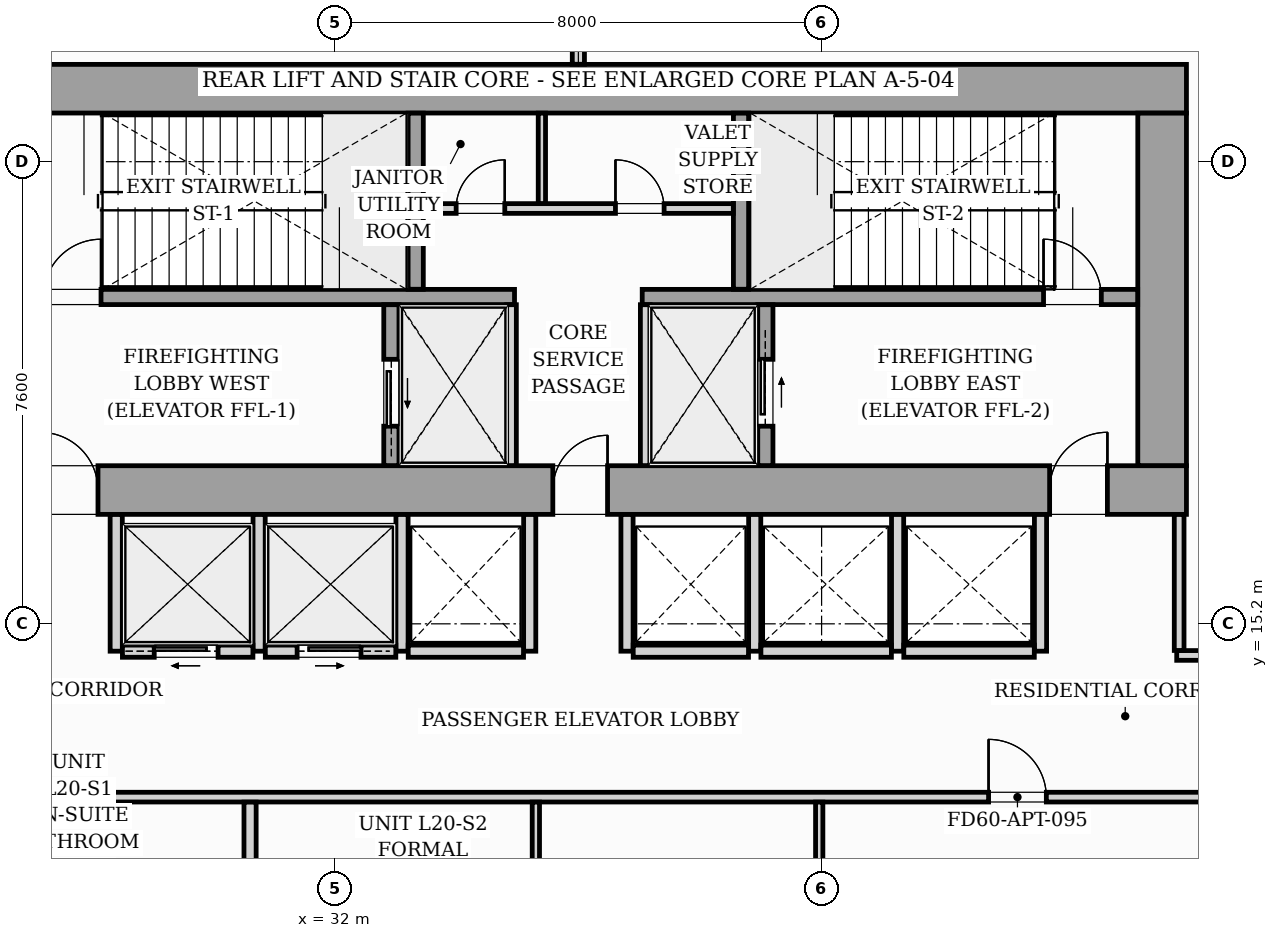
"""IFC4 building model, lengths in metres.
Left out: names, types, materials, properties, quantities, classifications, styles, units other than length and angle.
Written with IfcOpenShell. Run it as: python <this file> out.ifc"""

import sys

from ifc_helpers import new_model, si_unit, direction, frame, frame_2d, origin, origin_2d, place, context, subcontext, project, spatial, rectangle, i_section, extrude, source, transform, mapped, element, fill, save


model = new_model("IFC4")
c1 = context("Model", 3, precision=1e-05, world=origin(), true_north=direction((0.0, 1.0)))
c2 = subcontext(c1, "Body", "Model", "MODEL_VIEW")
j1 = project(units=[si_unit("LENGTHUNIT", "METRE"), si_unit("PLANEANGLEUNIT", "RADIAN")], contexts=[c1])
p1 = place(None, origin())
s1 = spatial("IfcSite", under=j1, at=p1, CompositionType="ELEMENT")
p2 = place(p1, origin())
s2 = spatial("IfcBuilding", under=s1, at=p2, CompositionType="ELEMENT")
p3 = place(p2, frame((0.0, 0.0, 72.6)))
s3 = spatial("IfcBuildingStorey", under=s2, at=p3, CompositionType="ELEMENT", Elevation=72.6)
m1 = source(origin(), c2, "Body", "SweptSolid", [
    extrude(i_section(OverallWidth=0.427, OverallDepth=0.483, WebThickness=0.051, FlangeThickness=0.082, FilletRadius=0.018, at=origin_2d()), origin(), (0.0, 0.0, 1.0), 5.196),
])
for number, where, z_axis, x_axis in (
    (1, (33.12, 17.4, 0.002), (0.0, 0.0, 1.0), (1.0, 0.0, 0.0)),
    (2, (38.88, 17.4, 0.002), (0.0, 0.0, 1.0), (1.0, 0.0, 0.0)),
    (3, (45.6, 17.4, 0.002), (0.0, 0.0, 1.0), (1.0, 0.0, 0.0)),
    (4, (33.12, 24.0, 0.002), (0.0, 0.0, 1.0), (1.0, 0.0, 0.0)),
    (5, (38.88, 24.0, 0.002), (0.0, 0.0, 1.0), (1.0, 0.0, 0.0)),
    (6, (45.6, 24.0, 0.002), (0.0, 0.0, 1.0), (1.0, 0.0, 0.0)),
):
    element("IfcColumn", number, at=place(p3, frame(where, z_axis=z_axis, x_axis=x_axis)), inside=s3, PredefinedType="PILASTER", context=c2, shape_type="MappedRepresentation", body=[
        mapped(m1, transform((0.0, 0.0, 0.0), scale=1.0)),
    ])
p4 = place(p3, frame((26.0, 17.4, 0.0), z_axis=(0.0, 0.0, 1.0), x_axis=(1.0, 0.0, 0.0)))
e7 = element("IfcWall", 7, at=p4, inside=s3, PredefinedType="SHEAR", context=c2, shape_type="SweptSolid", body=[
    extrude(rectangle(XDim=20.0, YDim=0.8, at=frame_2d((10.0, 0.0))), origin(), (0.0, 0.0, 1.0), 5.2),
])
p5 = place(p4, frame((1.15, 0.0, 0.0)))
e8 = element("IfcOpeningElement", 8, at=p5, cuts=e7, PredefinedType="OPENING", context=c2, shape_type="SweptSolid", body=[
    extrude(rectangle(XDim=0.95, YDim=2.06, at=frame_2d((0.475, 1.03))), frame((0.0, 0.41, 0.0), z_axis=(0.0, -1.0, 0.0), x_axis=(1.0, 0.0, 0.0)), (0.0, 0.0, 1.0), 0.82),
])
p6 = place(p4, frame((9.58, 0.0, 0.0)))
e9 = element("IfcOpeningElement", 9, at=p6, cuts=e7, PredefinedType="OPENING", context=c2, shape_type="SweptSolid", body=[
    extrude(rectangle(XDim=0.9, YDim=2.06, at=frame_2d((0.45, 1.03))), frame((0.0, 0.41, 0.0), z_axis=(0.0, -1.0, 0.0), x_axis=(1.0, 0.0, 0.0)), (0.0, 0.0, 1.0), 0.82),
])
p7 = place(p4, frame((17.75, 0.0, 0.0)))
e10 = element("IfcOpeningElement", 10, at=p7, cuts=e7, PredefinedType="OPENING", context=c2, shape_type="SweptSolid", body=[
    extrude(rectangle(XDim=0.95, YDim=2.06, at=frame_2d((0.475, 1.03))), frame((0.0, 0.41, 0.0), z_axis=(0.0, -1.0, 0.0), x_axis=(1.0, 0.0, 0.0)), (0.0, 0.0, 1.0), 0.82),
])
p8 = place(p3, frame((26.0, 24.0, 0.0), z_axis=(0.0, 0.0, 1.0), x_axis=(1.0, 0.0, 0.0)))
e11 = element("IfcWall", 11, at=p8, inside=s3, PredefinedType="SHEAR", context=c2, shape_type="SweptSolid", body=[
    extrude(rectangle(XDim=20.0, YDim=0.8, at=frame_2d((10.0, 0.0))), origin(), (0.0, 0.0, 1.0), 5.2),
])
p9 = place(p3, frame((45.6, 17.802, 0.0), z_axis=(0.0, 0.0, 1.0), x_axis=(0.0, 1.0, 0.0)))
e12 = element("IfcWall", 12, at=p9, inside=s3, PredefinedType="SHEAR", context=c2, shape_type="SweptSolid", body=[
    extrude(rectangle(XDim=5.796, YDim=0.8, at=frame_2d((2.898, 0.0))), origin(), (0.0, 0.0, 1.0), 5.2),
])
p10 = place(p3, frame((26.802, 20.575, 0.0), z_axis=(0.0, 0.0, 1.0), x_axis=(1.0, 0.0, 0.0)))
e13 = element("IfcWall", 13, at=p10, inside=s3, PredefinedType="SOLIDWALL", context=c2, shape_type="SweptSolid", body=[
    extrude(rectangle(XDim=8.148, YDim=0.25, at=frame_2d((4.074, 0.0))), origin(), (0.0, 0.0, 1.0), 5.2),
])
p11 = place(p10, frame((0.398, 0.0, 0.0)))
e14 = element("IfcOpeningElement", 14, at=p11, cuts=e13, PredefinedType="OPENING", context=c2, shape_type="SweptSolid", body=[
    extrude(rectangle(XDim=0.95, YDim=2.06, at=frame_2d((0.475, 1.03))), frame((0.0, 0.135, 0.0), z_axis=(0.0, -1.0, 0.0), x_axis=(1.0, 0.0, 0.0)), (0.0, 0.0, 1.0), 0.27),
])
p12 = place(p3, frame((37.05, 20.575, 0.0), z_axis=(0.0, 0.0, 1.0), x_axis=(1.0, 0.0, 0.0)))
e15 = element("IfcWall", 15, at=p12, inside=s3, PredefinedType="SOLIDWALL", context=c2, shape_type="SweptSolid", body=[
    extrude(rectangle(XDim=8.148, YDim=0.25, at=frame_2d((4.074, 0.0))), origin(), (0.0, 0.0, 1.0), 5.2),
])
p13 = place(p12, frame((6.6, 0.0, 0.0)))
e16 = element("IfcOpeningElement", 16, at=p13, cuts=e15, PredefinedType="OPENING", context=c2, shape_type="SweptSolid", body=[
    extrude(rectangle(XDim=0.95, YDim=2.06, at=frame_2d((0.475, 1.03))), frame((0.0, 0.135, 0.0), z_axis=(0.0, -1.0, 0.0), x_axis=(1.0, 0.0, 0.0)), (0.0, 0.0, 1.0), 0.27),
])
for number, where, z_axis, x_axis in (
    (17, (33.325, 20.702, 0.0), (0.0, 0.0, 1.0), (0.0, 1.0, 0.0)),
    (18, (38.675, 20.702, 0.0), (0.0, 0.0, 1.0), (0.0, 1.0, 0.0)),
):
    element("IfcWall", number, at=place(p3, frame(where, z_axis=z_axis, x_axis=x_axis)), inside=s3, PredefinedType="SOLIDWALL", context=c2, shape_type="SweptSolid", body=[
        extrude(rectangle(XDim=2.896, YDim=0.25, at=frame_2d((1.448, 0.0))), origin(), (0.0, 0.0, 1.0), 5.2),
    ])
p14 = place(p3, frame((32.925, 17.802, 0.0), z_axis=(0.0, 0.0, 1.0), x_axis=(0.0, 1.0, 0.0)))
e19 = element("IfcWall", 19, at=p14, inside=s3, PredefinedType="SOLIDWALL", context=c2, shape_type="SweptSolid", body=[
    extrude(rectangle(XDim=2.646, YDim=0.25, at=frame_2d((1.323, 0.0))), origin(), (0.0, 0.0, 1.0), 5.2),
])
p15 = place(p14, frame((0.648, 0.0, 0.0)))
e20 = element("IfcOpeningElement", 20, at=p15, cuts=e19, PredefinedType="OPENING", context=c2, shape_type="SweptSolid", body=[
    extrude(rectangle(XDim=1.1, YDim=2.08, at=frame_2d((0.55, 1.04))), frame((0.0, 0.135, 0.0), z_axis=(0.0, -1.0, 0.0), x_axis=(1.0, 0.0, 0.0)), (0.0, 0.0, 1.0), 0.27),
])
for number, where, z_axis, x_axis in (
    (21, (34.9, 17.802, 0.0), (0.0, 0.0, 1.0), (0.0, 1.0, 0.0)),
    (22, (37.1, 17.802, 0.0), (0.0, 0.0, 1.0), (0.0, 1.0, 0.0)),
):
    element("IfcWall", number, at=place(p3, frame(where, z_axis=z_axis, x_axis=x_axis)), inside=s3, PredefinedType="PARTITIONING", context=c2, shape_type="SweptSolid", body=[
        extrude(rectangle(XDim=2.646, YDim=0.16, at=frame_2d((1.323, 0.0))), origin(), (0.0, 0.0, 1.0), 4.78),
    ])
p16 = place(p3, frame((39.075, 17.802, 0.0), z_axis=(0.0, 0.0, 1.0), x_axis=(0.0, 1.0, 0.0)))
e23 = element("IfcWall", 23, at=p16, inside=s3, PredefinedType="SOLIDWALL", context=c2, shape_type="SweptSolid", body=[
    extrude(rectangle(XDim=2.646, YDim=0.25, at=frame_2d((1.323, 0.0))), origin(), (0.0, 0.0, 1.0), 5.2),
])
p17 = place(p16, frame((0.648, 0.0, 0.0)))
e24 = element("IfcOpeningElement", 24, at=p17, cuts=e23, PredefinedType="OPENING", context=c2, shape_type="SweptSolid", body=[
    extrude(rectangle(XDim=1.1, YDim=2.08, at=frame_2d((0.55, 1.04))), frame((0.0, 0.135, 0.0), z_axis=(0.0, -1.0, 0.0), x_axis=(1.0, 0.0, 0.0)), (0.0, 0.0, 1.0), 0.27),
])
p18 = place(p3, frame((33.452, 22.03, 0.0), z_axis=(0.0, 0.0, 1.0), x_axis=(1.0, 0.0, 0.0)))
e25 = element("IfcWall", 25, at=p18, inside=s3, PredefinedType="PARTITIONING", context=c2, shape_type="SweptSolid", body=[
    extrude(rectangle(XDim=5.096, YDim=0.16, at=frame_2d((2.548, 0.0))), origin(), (0.0, 0.0, 1.0), 4.78),
])
p19 = place(p18, frame((0.538, 0.0, 0.0)))
e26 = element("IfcOpeningElement", 26, at=p19, cuts=e25, PredefinedType="OPENING", context=c2, shape_type="SweptSolid", body=[
    extrude(rectangle(XDim=0.8, YDim=2.05, at=frame_2d((0.4, 1.025))), frame((0.0, 0.09, 0.0), z_axis=(0.0, -1.0, 0.0), x_axis=(1.0, 0.0, 0.0)), (0.0, 0.0, 1.0), 0.18),
])
p20 = place(p18, frame((3.158, 0.0, 0.0)))
e27 = element("IfcOpeningElement", 27, at=p20, cuts=e25, PredefinedType="OPENING", context=c2, shape_type="SweptSolid", body=[
    extrude(rectangle(XDim=0.8, YDim=2.05, at=frame_2d((0.4, 1.025))), frame((0.0, 0.09, 0.0), z_axis=(0.0, -1.0, 0.0), x_axis=(1.0, 0.0, 0.0)), (0.0, 0.0, 1.0), 0.18),
])
p21 = place(p3, frame((35.4, 22.112, 0.0), z_axis=(0.0, 0.0, 1.0), x_axis=(0.0, 1.0, 0.0)))
e28 = element("IfcWall", 28, at=p21, inside=s3, PredefinedType="PARTITIONING", context=c2, shape_type="SweptSolid", body=[
    extrude(rectangle(XDim=1.486, YDim=0.12, at=frame_2d((0.743, 0.0))), origin(), (0.0, 0.0, 1.0), 4.78),
])
for number, where, z_axis, x_axis in (
    (29, (28.4, 14.75, 0.0), (0.0, 0.0, 1.0), (0.0, 1.0, 0.0)),
    (30, (30.75, 14.75, 0.0), (0.0, 0.0, 1.0), (0.0, 1.0, 0.0)),
    (31, (33.1, 14.75, 0.0), (0.0, 0.0, 1.0), (0.0, 1.0, 0.0)),
):
    element("IfcWall", number, at=place(p3, frame(where, z_axis=z_axis, x_axis=x_axis)), inside=s3, PredefinedType="PARTITIONING", context=c2, shape_type="SweptSolid", body=[
        extrude(rectangle(XDim=2.248, YDim=0.2, at=frame_2d((1.124, 0.0))), origin(), (0.0, 0.0, 1.0), 4.78),
    ])
p22 = place(p3, frame((28.502, 14.75, 0.0), z_axis=(0.0, 0.0, 1.0), x_axis=(1.0, 0.0, 0.0)))
e32 = element("IfcWall", 32, at=p22, inside=s3, PredefinedType="PARTITIONING", context=c2, shape_type="SweptSolid", body=[
    extrude(rectangle(XDim=2.146, YDim=0.2, at=frame_2d((1.073, 0.0))), origin(), (0.0, 0.0, 1.0), 4.78),
])
p23 = place(p22, frame((0.523, 0.0, 0.0)))
e33 = element("IfcOpeningElement", 33, at=p23, cuts=e32, PredefinedType="OPENING", context=c2, shape_type="SweptSolid", body=[
    extrude(rectangle(XDim=1.05, YDim=2.08, at=frame_2d((0.525, 1.04))), frame((0.0, 0.11, 0.0), z_axis=(0.0, -1.0, 0.0), x_axis=(1.0, 0.0, 0.0)), (0.0, 0.0, 1.0), 0.22),
])
p24 = place(p3, frame((30.852, 14.75, 0.0), z_axis=(0.0, 0.0, 1.0), x_axis=(1.0, 0.0, 0.0)))
e34 = element("IfcWall", 34, at=p24, inside=s3, PredefinedType="PARTITIONING", context=c2, shape_type="SweptSolid", body=[
    extrude(rectangle(XDim=2.146, YDim=0.2, at=frame_2d((1.073, 0.0))), origin(), (0.0, 0.0, 1.0), 4.78),
])
p25 = place(p24, frame((0.523, 0.0, 0.0)))
e35 = element("IfcOpeningElement", 35, at=p25, cuts=e34, PredefinedType="OPENING", context=c2, shape_type="SweptSolid", body=[
    extrude(rectangle(XDim=1.05, YDim=2.08, at=frame_2d((0.525, 1.04))), frame((0.0, 0.11, 0.0), z_axis=(0.0, -1.0, 0.0), x_axis=(1.0, 0.0, 0.0)), (0.0, 0.0, 1.0), 0.22),
])
p26 = place(p3, frame((35.2, 14.75, 0.0), z_axis=(0.0, 0.0, 1.0), x_axis=(0.0, 1.0, 0.0)))
e36 = element("IfcWall", 36, at=p26, inside=s3, PredefinedType="PARTITIONING", context=c2, shape_type="SweptSolid", body=[
    extrude(rectangle(XDim=2.248, YDim=0.2, at=frame_2d((1.124, 0.0))), origin(), (0.0, 0.0, 1.0), 4.78),
])
p27 = place(p3, frame((33.202, 14.75, 0.0), z_axis=(0.0, 0.0, 1.0), x_axis=(1.0, 0.0, 0.0)))
e37 = element("IfcWall", 37, at=p27, inside=s3, PredefinedType="PARTITIONING", context=c2, shape_type="SweptSolid", body=[
    extrude(rectangle(XDim=1.896, YDim=0.2, at=frame_2d((0.948, 0.0))), origin(), (0.0, 0.0, 1.0), 4.78),
])
for number, where, z_axis, x_axis in (
    (38, (36.8, 14.75, 0.0), (0.0, 0.0, 1.0), (0.0, 1.0, 0.0)),
    (39, (38.9, 14.75, 0.0), (0.0, 0.0, 1.0), (0.0, 1.0, 0.0)),
):
    element("IfcWall", number, at=place(p3, frame(where, z_axis=z_axis, x_axis=x_axis)), inside=s3, PredefinedType="PARTITIONING", context=c2, shape_type="SweptSolid", body=[
        extrude(rectangle(XDim=2.248, YDim=0.2, at=frame_2d((1.124, 0.0))), origin(), (0.0, 0.0, 1.0), 4.78),
    ])
p28 = place(p3, frame((36.902, 14.75, 0.0), z_axis=(0.0, 0.0, 1.0), x_axis=(1.0, 0.0, 0.0)))
e40 = element("IfcWall", 40, at=p28, inside=s3, PredefinedType="PARTITIONING", context=c2, shape_type="SweptSolid", body=[
    extrude(rectangle(XDim=1.896, YDim=0.2, at=frame_2d((0.948, 0.0))), origin(), (0.0, 0.0, 1.0), 4.78),
])
for number, where, z_axis, x_axis in (
    (41, (41.25, 14.75, 0.0), (0.0, 0.0, 1.0), (0.0, 1.0, 0.0)),
    (42, (43.6, 14.75, 0.0), (0.0, 0.0, 1.0), (0.0, 1.0, 0.0)),
):
    element("IfcWall", number, at=place(p3, frame(where, z_axis=z_axis, x_axis=x_axis)), inside=s3, PredefinedType="PARTITIONING", context=c2, shape_type="SweptSolid", body=[
        extrude(rectangle(XDim=2.248, YDim=0.2, at=frame_2d((1.124, 0.0))), origin(), (0.0, 0.0, 1.0), 4.78),
    ])
for number, where, z_axis, x_axis in (
    (43, (39.002, 14.75, 0.0), (0.0, 0.0, 1.0), (1.0, 0.0, 0.0)),
    (44, (41.352, 14.75, 0.0), (0.0, 0.0, 1.0), (1.0, 0.0, 0.0)),
):
    element("IfcWall", number, at=place(p3, frame(where, z_axis=z_axis, x_axis=x_axis)), inside=s3, PredefinedType="PARTITIONING", context=c2, shape_type="SweptSolid", body=[
        extrude(rectangle(XDim=2.146, YDim=0.2, at=frame_2d((1.073, 0.0))), origin(), (0.0, 0.0, 1.0), 4.78),
    ])
p29 = place(p3, frame((16.6, 12.35, 0.0), z_axis=(0.0, 0.0, 1.0), x_axis=(1.0, 0.0, 0.0)))
e45 = element("IfcWall", 45, at=p29, inside=s3, PredefinedType="PARTITIONING", context=c2, shape_type="SweptSolid", body=[
    extrude(rectangle(XDim=37.6, YDim=0.16, at=frame_2d((18.8, 0.0))), origin(), (0.0, 0.0, 1.0), 4.78),
])
p30 = place(p29, frame((2.665, 0.0, 0.0)))
e46 = element("IfcOpeningElement", 46, at=p30, cuts=e45, PredefinedType="OPENING", context=c2, shape_type="SweptSolid", body=[
    extrude(rectangle(XDim=0.95, YDim=2.06, at=frame_2d((0.475, 1.03))), frame((0.0, 0.09, 0.0), z_axis=(0.0, -1.0, 0.0), x_axis=(1.0, 0.0, 0.0)), (0.0, 0.0, 1.0), 0.18),
])
p31 = place(p29, frame((26.146, 0.0, 0.0)))
e47 = element("IfcOpeningElement", 47, at=p31, cuts=e45, PredefinedType="OPENING", context=c2, shape_type="SweptSolid", body=[
    extrude(rectangle(XDim=0.95, YDim=2.06, at=frame_2d((0.475, 1.03))), frame((0.0, 0.09, 0.0), z_axis=(0.0, -1.0, 0.0), x_axis=(1.0, 0.0, 0.0)), (0.0, 0.0, 1.0), 0.18),
])
p32 = place(p3, frame((36.0, 24.402, 0.0), z_axis=(0.0, 0.0, 1.0), x_axis=(0.0, 1.0, 0.0)))
e48 = element("IfcWall", 48, at=p32, inside=s3, PredefinedType="PARTITIONING", context=c2, shape_type="SweptSolid", body=[
    extrude(rectangle(XDim=1.373, YDim=0.2, at=frame_2d((0.687, 0.0))), origin(), (0.0, 0.0, 1.0), 4.78),
])
p33 = place(p3, frame((30.601, 10.112, 0.0), z_axis=(0.0, 0.0, 1.0), x_axis=(0.0, 1.0, 0.0)))
e49 = element("IfcWall", 49, at=p33, inside=s3, PredefinedType="PARTITIONING", context=c2, shape_type="SweptSolid", body=[
    extrude(rectangle(XDim=2.156, YDim=0.2, at=frame_2d((1.078, 0.0))), origin(), (0.0, 0.0, 1.0), 4.78),
])
p34 = place(p3, frame((35.301, 6.142, 0.0), z_axis=(0.0, 0.0, 1.0), x_axis=(0.0, 1.0, 0.0)))
e50 = element("IfcWall", 50, at=p34, inside=s3, PredefinedType="PARTITIONING", context=c2, shape_type="SweptSolid", body=[
    extrude(rectangle(XDim=6.126, YDim=0.12, at=frame_2d((3.063, 0.0))), origin(), (0.0, 0.0, 1.0), 4.78),
])
p35 = place(p34, frame((2.575, 0.0, 0.0)))
e51 = element("IfcOpeningElement", 51, at=p35, cuts=e50, PredefinedType="OPENING", context=c2, shape_type="SweptSolid", body=[
    extrude(rectangle(XDim=0.85, YDim=2.05, at=frame_2d((0.425, 1.025))), frame((0.0, 0.07, 0.0), z_axis=(0.0, -1.0, 0.0), x_axis=(1.0, 0.0, 0.0)), (0.0, 0.0, 1.0), 0.14),
])
p36 = place(p3, frame((39.961, 6.59, 0.0), z_axis=(0.0, 0.0, 1.0), x_axis=(0.0, 1.0, 0.0)))
e52 = element("IfcWall", 52, at=p36, inside=s3, PredefinedType="PARTITIONING", context=c2, shape_type="SweptSolid", body=[
    extrude(rectangle(XDim=5.678, YDim=0.12, at=frame_2d((2.839, 0.0))), origin(), (0.0, 0.0, 1.0), 4.78),
])
p37 = place(p36, frame((2.182, 0.0, 0.0)))
e53 = element("IfcOpeningElement", 53, at=p37, cuts=e52, PredefinedType="OPENING", context=c2, shape_type="SweptSolid", body=[
    extrude(rectangle(XDim=0.85, YDim=2.05, at=frame_2d((0.425, 1.025))), frame((0.0, 0.07, 0.0), z_axis=(0.0, -1.0, 0.0), x_axis=(1.0, 0.0, 0.0)), (0.0, 0.0, 1.0), 0.14),
])
p38 = place(p3, frame((45.84, 14.68, 0.0), z_axis=(0.0, 0.0, 1.0), x_axis=(1.0, 0.0, 0.0)))
e54 = element("IfcWall", 54, at=p38, inside=s3, PredefinedType="PARTITIONING", context=c2, shape_type="SweptSolid", body=[
    extrude(rectangle(XDim=8.278, YDim=0.16, at=frame_2d((4.139, 0.0))), origin(), (0.0, 0.0, 1.0), 4.78),
])
p39 = place(p38, frame((3.765, 0.0, 0.0)))
e55 = element("IfcOpeningElement", 55, at=p39, cuts=e54, PredefinedType="OPENING", context=c2, shape_type="SweptSolid", body=[
    extrude(rectangle(XDim=0.95, YDim=2.06, at=frame_2d((0.475, 1.03))), frame((0.0, 0.09, 0.0), z_axis=(0.0, -1.0, 0.0), x_axis=(1.0, 0.0, 0.0)), (0.0, 0.0, 1.0), 0.18),
])
p40 = place(p3, frame((45.88, 14.762, 0.0), z_axis=(0.0, 0.0, 1.0), x_axis=(0.0, 1.0, 0.0)))
e56 = element("IfcWall", 56, at=p40, inside=s3, PredefinedType="PARTITIONING", context=c2, shape_type="SweptSolid", body=[
    extrude(rectangle(XDim=2.236, YDim=0.16, at=frame_2d((1.118, 0.0))), origin(), (0.0, 0.0, 1.0), 4.78),
])
m2 = source(origin(), c2, "Body", "SweptSolid", [
    extrude(rectangle(XDim=0.95, YDim=2.06, at=frame_2d((0.475, 1.03))), frame((0.0, 0.025, 0.0), z_axis=(0.0, -1.0, 0.0), x_axis=(1.0, 0.0, 0.0)), (0.0, 0.0, 1.0), 0.05),
])
p41 = place(p5, origin())
e57 = element("IfcDoor", 57, at=p41, inside=s3, OperationType="SINGLE_SWING_LEFT", PredefinedType="DOOR", context=c2, shape_type="MappedRepresentation", body=[
    mapped(m2, transform((0.0, 0.0, 0.0), scale=1.0)),
])
fill(e8, e57)
m3 = source(origin(), c2, "Body", "SweptSolid", [
    extrude(rectangle(XDim=0.9, YDim=2.06, at=frame_2d((0.45, 1.03))), frame((0.0, 0.025, 0.0), z_axis=(0.0, -1.0, 0.0), x_axis=(1.0, 0.0, 0.0)), (0.0, 0.0, 1.0), 0.05),
])
p42 = place(p6, origin())
e58 = element("IfcDoor", 58, at=p42, inside=s3, OperationType="SINGLE_SWING_RIGHT", PredefinedType="DOOR", context=c2, shape_type="MappedRepresentation", body=[
    mapped(m3, transform((0.0, 0.0, 0.0), scale=1.0)),
])
fill(e9, e58)
p43 = place(p7, origin())
e59 = element("IfcDoor", 59, at=p43, inside=s3, OperationType="SINGLE_SWING_RIGHT", PredefinedType="DOOR", context=c2, shape_type="MappedRepresentation", body=[
    mapped(m2, transform((0.0, 0.0, 0.0), scale=1.0)),
])
fill(e10, e59)
p44 = place(p11, origin())
e60 = element("IfcDoor", 60, at=p44, inside=s3, OperationType="SINGLE_SWING_RIGHT", PredefinedType="DOOR", context=c2, shape_type="MappedRepresentation", body=[
    mapped(m2, transform((0.0, 0.0, 0.0), scale=1.0)),
])
fill(e14, e60)
p45 = place(p13, origin())
e61 = element("IfcDoor", 61, at=p45, inside=s3, OperationType="SINGLE_SWING_LEFT", PredefinedType="DOOR", context=c2, shape_type="MappedRepresentation", body=[
    mapped(m2, transform((0.0, 0.0, 0.0), scale=1.0)),
])
fill(e16, e61)
m4 = source(origin(), c2, "Body", "SweptSolid", [
    extrude(rectangle(XDim=1.1, YDim=2.08, at=frame_2d((0.55, 1.04))), frame((0.0, 0.025, 0.0), z_axis=(0.0, -1.0, 0.0), x_axis=(1.0, 0.0, 0.0)), (0.0, 0.0, 1.0), 0.05),
])
p46 = place(p15, origin())
e62 = element("IfcDoor", 62, at=p46, inside=s3, OperationType="SLIDING_TO_LEFT", PredefinedType="DOOR", context=c2, shape_type="MappedRepresentation", body=[
    mapped(m4, transform((0.0, 0.0, 0.0), scale=1.0)),
])
fill(e20, e62)
p47 = place(p17, origin())
e63 = element("IfcDoor", 63, at=p47, inside=s3, OperationType="SLIDING_TO_RIGHT", PredefinedType="DOOR", context=c2, shape_type="MappedRepresentation", body=[
    mapped(m4, transform((0.0, 0.0, 0.0), scale=1.0)),
])
fill(e24, e63)
m5 = source(origin(), c2, "Body", "SweptSolid", [
    extrude(rectangle(XDim=0.8, YDim=2.05, at=frame_2d((0.4, 1.025))), frame((0.0, 0.025, 0.0), z_axis=(0.0, -1.0, 0.0), x_axis=(1.0, 0.0, 0.0)), (0.0, 0.0, 1.0), 0.05),
])
p48 = place(p19, origin())
e64 = element("IfcDoor", 64, at=p48, inside=s3, OperationType="SINGLE_SWING_RIGHT", PredefinedType="DOOR", context=c2, shape_type="MappedRepresentation", body=[
    mapped(m5, transform((0.0, 0.0, 0.0), scale=1.0)),
])
fill(e26, e64)
p49 = place(p20, origin())
e65 = element("IfcDoor", 65, at=p49, inside=s3, OperationType="SINGLE_SWING_LEFT", PredefinedType="DOOR", context=c2, shape_type="MappedRepresentation", body=[
    mapped(m5, transform((0.0, 0.0, 0.0), scale=1.0)),
])
fill(e27, e65)
m6 = source(origin(), c2, "Body", "SweptSolid", [
    extrude(rectangle(XDim=1.05, YDim=2.08, at=frame_2d((0.525, 1.04))), frame((0.0, 0.025, 0.0), z_axis=(0.0, -1.0, 0.0), x_axis=(1.0, 0.0, 0.0)), (0.0, 0.0, 1.0), 0.05),
])
p50 = place(p23, origin())
e66 = element("IfcDoor", 66, at=p50, inside=s3, OperationType="SLIDING_TO_LEFT", PredefinedType="DOOR", context=c2, shape_type="MappedRepresentation", body=[
    mapped(m6, transform((0.0, 0.0, 0.0), scale=1.0)),
])
fill(e33, e66)
p51 = place(p25, origin())
e67 = element("IfcDoor", 67, at=p51, inside=s3, OperationType="SLIDING_TO_RIGHT", PredefinedType="DOOR", context=c2, shape_type="MappedRepresentation", body=[
    mapped(m6, transform((0.0, 0.0, 0.0), scale=1.0)),
])
fill(e35, e67)
m7 = source(origin(), c2, "Body", "SweptSolid", [
    extrude(rectangle(XDim=0.95, YDim=2.06, at=frame_2d((0.475, 1.03))), frame((0.0, 0.025, 0.0), z_axis=(0.0, -1.0, 0.0), x_axis=(1.0, 0.0, 0.0)), (0.0, 0.0, 1.0), 0.05),
])
p52 = place(p31, origin())
e68 = element("IfcDoor", 68, at=p52, inside=s3, OperationType="SINGLE_SWING_LEFT", PredefinedType="DOOR", context=c2, shape_type="MappedRepresentation", body=[
    mapped(m7, transform((0.0, 0.0, 0.0), scale=1.0)),
])
fill(e47, e68)
save(model, sys.argv[1])
